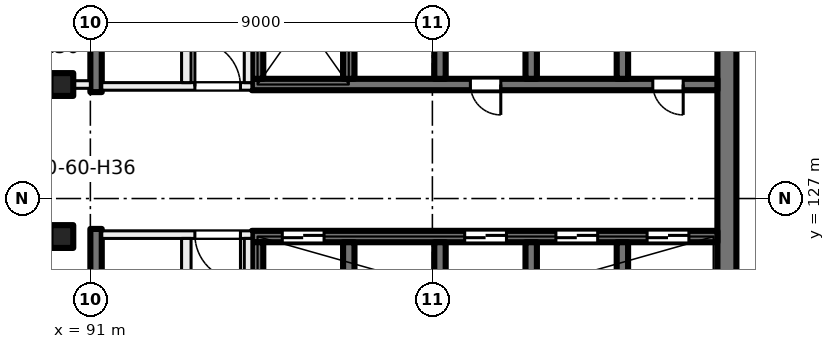
"""IFC4 building model, lengths in metres.
Left out: names, types, materials, properties, quantities, classifications, styles, units other than length and angle.
Written with IfcOpenShell. Run it as: python <this file> out.ifc"""

import sys

from ifc_helpers import new_model, si_unit, direction, frame, frame_2d, origin, origin_2d, place, context, subcontext, project, spatial, rectangle, extrude, element, fill, save


model = new_model("IFC4")
c1 = context("Model", 3, precision=1e-05, world=origin(), true_north=direction((0.0, 1.0)))
c2 = subcontext(c1, "Body", "Model", "MODEL_VIEW")
j1 = project(units=[si_unit("LENGTHUNIT", "METRE"), si_unit("PLANEANGLEUNIT", "RADIAN")], contexts=[c1])
p1 = place(None, origin())
s1 = spatial("IfcSite", under=j1, at=p1, CompositionType="ELEMENT")
p2 = place(p1, origin())
s2 = spatial("IfcBuilding", under=s1, at=p2, CompositionType="ELEMENT")
p3 = place(p2, frame((0.0, 0.0, 216.0)))
s3 = spatial("IfcBuildingStorey", under=s2, at=p3, CompositionType="ELEMENT", Elevation=216.0)
for number, where, z_axis, x_axis in (
    (1, (90.25, 130.0, 0.0), (0.0, 0.0, 1.0), (1.0, 0.0, 0.0)),
    (2, (90.25, 126.0, 0.0), (0.0, 0.0, 1.0), (1.0, 0.0, 0.0)),
):
    element("IfcColumn", number, at=place(p3, frame(where, z_axis=z_axis, x_axis=x_axis)), inside=s3, PredefinedType="COLUMN", context=c2, shape_type="SweptSolid", body=[
        extrude(rectangle(XDim=0.6, YDim=0.6, at=origin_2d()), origin(), (0.0, 0.0, 1.0), 4.0),
    ])
p4 = place(p3, frame((107.75, 135.2, 0.0), z_axis=(0.0, 0.0, 1.0), x_axis=(0.0, -1.0, 0.0)))
e3 = element("IfcWall", 3, at=p4, inside=s3, PredefinedType="SHEAR", context=c2, shape_type="SweptSolid", body=[
    extrude(rectangle(XDim=14.4, YDim=0.5, at=frame_2d((7.2, 0.0))), origin(), (0.0, 0.0, 1.0), 4.0),
])
p5 = place(p3, frame((107.5, 130.0, 0.0), z_axis=(0.0, 0.0, 1.0), x_axis=(-1.0, 0.0, 0.0)))
e4 = element("IfcWall", 4, at=p5, inside=s3, PredefinedType="SHEAR", context=c2, shape_type="SweptSolid", body=[
    extrude(rectangle(XDim=12.25, YDim=0.3, at=frame_2d((6.125, 0.0))), origin(), (0.0, 0.0, 1.0), 4.0),
])
p6 = place(p5, frame((0.9, 0.0, 0.0)))
e5 = element("IfcOpeningElement", 5, at=p6, cuts=e4, PredefinedType="OPENING", context=c2, shape_type="SweptSolid", body=[
    extrude(rectangle(XDim=0.8, YDim=2.1, at=frame_2d((0.4, 1.05))), frame((0.0, 0.16, 0.0), z_axis=(0.0, -1.0, 0.0), x_axis=(1.0, 0.0, 0.0)), (0.0, 0.0, 1.0), 0.32),
])
p7 = place(p5, frame((5.7, 0.0, 0.0)))
e6 = element("IfcOpeningElement", 6, at=p7, cuts=e4, PredefinedType="OPENING", context=c2, shape_type="SweptSolid", body=[
    extrude(rectangle(XDim=0.8, YDim=2.1, at=frame_2d((0.4, 1.05))), frame((0.0, 0.16, 0.0), z_axis=(0.0, -1.0, 0.0), x_axis=(1.0, 0.0, 0.0)), (0.0, 0.0, 1.0), 0.32),
])
for number, where, z_axis, x_axis in (
    (7, (105.0, 133.25, 0.0), (0.0, 0.0, 1.0), (0.0, -1.0, 0.0)),
    (8, (102.6, 133.25, 0.0), (0.0, 0.0, 1.0), (0.0, -1.0, 0.0)),
    (9, (100.2, 133.25, 0.0), (0.0, 0.0, 1.0), (0.0, -1.0, 0.0)),
    (10, (97.8, 133.25, 0.0), (0.0, 0.0, 1.0), (0.0, -1.0, 0.0)),
    (11, (95.4, 133.25, 0.0), (0.0, 0.0, 1.0), (0.0, -1.0, 0.0)),
):
    element("IfcWall", number, at=place(p3, frame(where, z_axis=z_axis, x_axis=x_axis)), inside=s3, PredefinedType="SHEAR", context=c2, shape_type="SweptSolid", body=[
        extrude(rectangle(XDim=3.1, YDim=0.3, at=frame_2d((1.55, 0.0))), origin(), (0.0, 0.0, 1.0), 4.0),
    ])
p8 = place(p3, frame((107.5, 126.0, 0.0), z_axis=(0.0, 0.0, 1.0), x_axis=(-1.0, 0.0, 0.0)))
e12 = element("IfcWall", 12, at=p8, inside=s3, PredefinedType="SHEAR", context=c2, shape_type="SweptSolid", body=[
    extrude(rectangle(XDim=12.25, YDim=0.3, at=frame_2d((6.125, 0.0))), origin(), (0.0, 0.0, 1.0), 4.0),
])
p9 = place(p8, frame((0.75, 0.0, 0.0)))
e13 = element("IfcOpeningElement", 13, at=p9, cuts=e12, PredefinedType="OPENING", context=c2, shape_type="SweptSolid", body=[
    extrude(rectangle(XDim=1.1, YDim=2.1, at=frame_2d((0.55, 1.05))), frame((0.0, 0.16, 0.0), z_axis=(0.0, -1.0, 0.0), x_axis=(1.0, 0.0, 0.0)), (0.0, 0.0, 1.0), 0.32),
])
p10 = place(p8, frame((3.15, 0.0, 0.0)))
e14 = element("IfcOpeningElement", 14, at=p10, cuts=e12, PredefinedType="OPENING", context=c2, shape_type="SweptSolid", body=[
    extrude(rectangle(XDim=1.1, YDim=2.1, at=frame_2d((0.55, 1.05))), frame((0.0, 0.16, 0.0), z_axis=(0.0, -1.0, 0.0), x_axis=(1.0, 0.0, 0.0)), (0.0, 0.0, 1.0), 0.32),
])
p11 = place(p8, frame((5.55, 0.0, 0.0)))
e15 = element("IfcOpeningElement", 15, at=p11, cuts=e12, PredefinedType="OPENING", context=c2, shape_type="SweptSolid", body=[
    extrude(rectangle(XDim=1.1, YDim=2.1, at=frame_2d((0.55, 1.05))), frame((0.0, 0.16, 0.0), z_axis=(0.0, -1.0, 0.0), x_axis=(1.0, 0.0, 0.0)), (0.0, 0.0, 1.0), 0.32),
])
p12 = place(p8, frame((10.35, 0.0, 0.0)))
e16 = element("IfcOpeningElement", 16, at=p12, cuts=e12, PredefinedType="OPENING", context=c2, shape_type="SweptSolid", body=[
    extrude(rectangle(XDim=1.1, YDim=2.1, at=frame_2d((0.55, 1.05))), frame((0.0, 0.16, 0.0), z_axis=(0.0, -1.0, 0.0), x_axis=(1.0, 0.0, 0.0)), (0.0, 0.0, 1.0), 0.32),
])
for number, where, z_axis, x_axis in (
    (17, (105.0, 125.85, 0.0), (0.0, 0.0, 1.0), (0.0, -1.0, 0.0)),
    (18, (102.6, 125.85, 0.0), (0.0, 0.0, 1.0), (0.0, -1.0, 0.0)),
    (19, (100.2, 125.85, 0.0), (0.0, 0.0, 1.0), (0.0, -1.0, 0.0)),
    (20, (97.8, 125.85, 0.0), (0.0, 0.0, 1.0), (0.0, -1.0, 0.0)),
    (21, (95.4, 125.85, 0.0), (0.0, 0.0, 1.0), (0.0, -1.0, 0.0)),
):
    element("IfcWall", number, at=place(p3, frame(where, z_axis=z_axis, x_axis=x_axis)), inside=s3, PredefinedType="SHEAR", context=c2, shape_type="SweptSolid", body=[
        extrude(rectangle(XDim=3.1, YDim=0.3, at=frame_2d((1.55, 0.0))), origin(), (0.0, 0.0, 1.0), 4.0),
    ])
for number, where, z_axis, x_axis in (
    (22, (91.15, 138.5, 0.0), (0.0, 0.0, 1.0), (0.0, -1.0, 0.0)),
    (23, (91.15, 126.2, 0.0), (0.0, 0.0, 1.0), (0.0, -1.0, 0.0)),
):
    element("IfcWall", number, at=place(p3, frame(where, z_axis=z_axis, x_axis=x_axis)), inside=s3, PredefinedType="SHEAR", context=c2, shape_type="SweptSolid", body=[
        extrude(rectangle(XDim=8.7, YDim=0.3, at=frame_2d((4.35, 0.0))), origin(), (0.0, 0.0, 1.0), 4.0),
    ])
p13 = place(p3, frame((95.25, 126.05, 0.0), z_axis=(0.0, 0.0, 1.0), x_axis=(-1.0, 0.0, 0.0)))
e24 = element("IfcWall", 24, at=p13, inside=s3, PredefinedType="PARTITIONING", context=c2, shape_type="SweptSolid", body=[
    extrude(rectangle(XDim=3.95, YDim=0.2, at=frame_2d((1.975, 0.0))), origin(), (0.0, 0.0, 1.0), 3.625),
])
p14 = place(p13, frame((0.3, 0.0, 0.0)))
e25 = element("IfcOpeningElement", 25, at=p14, cuts=e24, PredefinedType="OPENING", context=c2, shape_type="SweptSolid", body=[
    extrude(rectangle(XDim=1.2, YDim=2.1, at=frame_2d((0.6, 1.05))), frame((0.0, 0.11, 0.0), z_axis=(0.0, -1.0, 0.0), x_axis=(1.0, 0.0, 0.0)), (0.0, 0.0, 1.0), 0.22),
])
p15 = place(p3, frame((95.15, 117.5, 0.0), z_axis=(0.0, 0.0, 1.0), x_axis=(0.0, 1.0, 0.0)))
e26 = element("IfcWall", 26, at=p15, inside=s3, PredefinedType="PARTITIONING", context=c2, shape_type="SweptSolid", body=[
    extrude(rectangle(XDim=8.45, YDim=0.2, at=frame_2d((4.225, 0.0))), origin(), (0.0, 0.0, 1.0), 3.625),
])
p16 = place(p15, frame((1.725, 0.0, 0.0)))
e27 = element("IfcOpeningElement", 27, at=p16, cuts=e26, PredefinedType="OPENING", context=c2, shape_type="SweptSolid", body=[
    extrude(rectangle(XDim=1.5, YDim=2.1, at=frame_2d((0.75, 1.05))), frame((0.0, 0.11, 0.0), z_axis=(0.0, -1.0, 0.0), x_axis=(1.0, 0.0, 0.0)), (0.0, 0.0, 1.0), 0.22),
])
p17 = place(p3, frame((93.525, 117.5, 0.0), z_axis=(0.0, 0.0, 1.0), x_axis=(0.0, 1.0, 0.0)))
e28 = element("IfcWall", 28, at=p17, inside=s3, PredefinedType="PARTITIONING", context=c2, shape_type="SweptSolid", body=[
    extrude(rectangle(XDim=8.45, YDim=0.25, at=frame_2d((4.225, 0.0))), origin(), (0.0, 0.0, 1.0), 3.625),
])
p18 = place(p17, frame((5.96, 0.0, 0.0)))
e29 = element("IfcOpeningElement", 29, at=p18, cuts=e28, PredefinedType="OPENING", context=c2, shape_type="SweptSolid", body=[
    extrude(rectangle(XDim=0.8, YDim=2.1, at=frame_2d((0.4, 1.05))), frame((0.0, 0.135, 0.0), z_axis=(0.0, -1.0, 0.0), x_axis=(1.0, 0.0, 0.0)), (0.0, 0.0, 1.0), 0.27),
])
p19 = place(p17, frame((1.585, 0.0, 0.0)))
e30 = element("IfcOpeningElement", 30, at=p19, cuts=e28, PredefinedType="OPENING", context=c2, shape_type="SweptSolid", body=[
    extrude(rectangle(XDim=1.0, YDim=2.1, at=frame_2d((0.5, 1.05))), frame((0.0, 0.135, 0.0), z_axis=(0.0, -1.0, 0.0), x_axis=(1.0, 0.0, 0.0)), (0.0, 0.0, 1.0), 0.27),
])
p20 = place(p3, frame((91.3, 129.95, 0.0), z_axis=(0.0, 0.0, 1.0), x_axis=(1.0, 0.0, 0.0)))
e31 = element("IfcWall", 31, at=p20, inside=s3, PredefinedType="PARTITIONING", context=c2, shape_type="SweptSolid", body=[
    extrude(rectangle(XDim=3.95, YDim=0.2, at=frame_2d((1.975, 0.0))), origin(), (0.0, 0.0, 1.0), 3.625),
])
p21 = place(p20, frame((2.45, 0.0, 0.0)))
e32 = element("IfcOpeningElement", 32, at=p21, cuts=e31, PredefinedType="OPENING", context=c2, shape_type="SweptSolid", body=[
    extrude(rectangle(XDim=1.2, YDim=2.1, at=frame_2d((0.6, 1.05))), frame((0.0, 0.11, 0.0), z_axis=(0.0, -1.0, 0.0), x_axis=(1.0, 0.0, 0.0)), (0.0, 0.0, 1.0), 0.22),
])
p22 = place(p3, frame((95.15, 130.05, 0.0), z_axis=(0.0, 0.0, 1.0), x_axis=(0.0, 1.0, 0.0)))
e33 = element("IfcWall", 33, at=p22, inside=s3, PredefinedType="PARTITIONING", context=c2, shape_type="SweptSolid", body=[
    extrude(rectangle(XDim=8.45, YDim=0.2, at=frame_2d((4.225, 0.0))), origin(), (0.0, 0.0, 1.0), 3.625),
])
p23 = place(p22, frame((5.225, 0.0, 0.0)))
e34 = element("IfcOpeningElement", 34, at=p23, cuts=e33, PredefinedType="OPENING", context=c2, shape_type="SweptSolid", body=[
    extrude(rectangle(XDim=1.5, YDim=2.1, at=frame_2d((0.75, 1.05))), frame((0.0, 0.11, 0.0), z_axis=(0.0, -1.0, 0.0), x_axis=(1.0, 0.0, 0.0)), (0.0, 0.0, 1.0), 0.22),
])
p24 = place(p3, frame((93.525, 130.05, 0.0), z_axis=(0.0, 0.0, 1.0), x_axis=(0.0, 1.0, 0.0)))
e35 = element("IfcWall", 35, at=p24, inside=s3, PredefinedType="PARTITIONING", context=c2, shape_type="SweptSolid", body=[
    extrude(rectangle(XDim=8.45, YDim=0.25, at=frame_2d((4.225, 0.0))), origin(), (0.0, 0.0, 1.0), 3.625),
])
p25 = place(p24, frame((2.39, 0.0, 0.0)))
e36 = element("IfcOpeningElement", 36, at=p25, cuts=e35, PredefinedType="OPENING", context=c2, shape_type="SweptSolid", body=[
    extrude(rectangle(XDim=0.8, YDim=2.1, at=frame_2d((0.4, 1.05))), frame((0.0, 0.135, 0.0), z_axis=(0.0, -1.0, 0.0), x_axis=(1.0, 0.0, 0.0)), (0.0, 0.0, 1.0), 0.27),
])
p26 = place(p24, frame((6.665, 0.0, 0.0)))
e37 = element("IfcOpeningElement", 37, at=p26, cuts=e35, PredefinedType="OPENING", context=c2, shape_type="SweptSolid", body=[
    extrude(rectangle(XDim=0.8, YDim=2.1, at=frame_2d((0.4, 1.05))), frame((0.0, 0.135, 0.0), z_axis=(0.0, -1.0, 0.0), x_axis=(1.0, 0.0, 0.0)), (0.0, 0.0, 1.0), 0.27),
])
p27 = place(p3, frame((87.7, 130.0, 0.0), z_axis=(0.0, 0.0, 1.0), x_axis=(1.0, 0.0, 0.0)))
e38 = element("IfcWall", 38, at=p27, inside=s3, PredefinedType="PARTITIONING", context=c2, shape_type="SweptSolid", body=[
    extrude(rectangle(XDim=3.3, YDim=0.2, at=frame_2d((1.65, 0.0))), origin(), (0.0, 0.0, 1.0), 3.625),
])
p28 = place(p9, origin())
e39 = element("IfcDoor", 39, at=p28, inside=s3, OperationType="DOUBLE_DOOR_SLIDING", PredefinedType="DOOR", context=c2, shape_type="SweptSolid", body=[
    extrude(rectangle(XDim=1.1, YDim=2.1, at=frame_2d((0.55, 1.05))), frame((0.0, 0.025, 0.0), z_axis=(0.0, -1.0, 0.0), x_axis=(1.0, 0.0, 0.0)), (0.0, 0.0, 1.0), 0.05),
])
fill(e13, e39)
p29 = place(p10, origin())
e40 = element("IfcDoor", 40, at=p29, inside=s3, OperationType="DOUBLE_DOOR_SLIDING", PredefinedType="DOOR", context=c2, shape_type="SweptSolid", body=[
    extrude(rectangle(XDim=1.1, YDim=2.1, at=frame_2d((0.55, 1.05))), frame((0.0, 0.025, 0.0), z_axis=(0.0, -1.0, 0.0), x_axis=(1.0, 0.0, 0.0)), (0.0, 0.0, 1.0), 0.05),
])
fill(e14, e40)
p30 = place(p11, origin())
e41 = element("IfcDoor", 41, at=p30, inside=s3, OperationType="DOUBLE_DOOR_SLIDING", PredefinedType="DOOR", context=c2, shape_type="SweptSolid", body=[
    extrude(rectangle(XDim=1.1, YDim=2.1, at=frame_2d((0.55, 1.05))), frame((0.0, 0.025, 0.0), z_axis=(0.0, -1.0, 0.0), x_axis=(1.0, 0.0, 0.0)), (0.0, 0.0, 1.0), 0.05),
])
fill(e15, e41)
p31 = place(p12, origin())
e42 = element("IfcDoor", 42, at=p31, inside=s3, OperationType="DOUBLE_DOOR_SLIDING", PredefinedType="DOOR", context=c2, shape_type="SweptSolid", body=[
    extrude(rectangle(XDim=1.1, YDim=2.1, at=frame_2d((0.55, 1.05))), frame((0.0, 0.025, 0.0), z_axis=(0.0, -1.0, 0.0), x_axis=(1.0, 0.0, 0.0)), (0.0, 0.0, 1.0), 0.05),
])
fill(e16, e42)
p32 = place(p6, origin())
e43 = element("IfcDoor", 43, at=p32, inside=s3, OperationType="SINGLE_SWING_LEFT", PredefinedType="DOOR", context=c2, shape_type="SweptSolid", body=[
    extrude(rectangle(XDim=0.8, YDim=2.1, at=frame_2d((0.4, 1.05))), frame((0.0, 0.025, 0.0), z_axis=(0.0, -1.0, 0.0), x_axis=(1.0, 0.0, 0.0)), (0.0, 0.0, 1.0), 0.05),
])
fill(e5, e43)
p33 = place(p7, origin())
e44 = element("IfcDoor", 44, at=p33, inside=s3, OperationType="SINGLE_SWING_RIGHT", PredefinedType="DOOR", context=c2, shape_type="SweptSolid", body=[
    extrude(rectangle(XDim=0.8, YDim=2.1, at=frame_2d((0.4, 1.05))), frame((0.0, 0.025, 0.0), z_axis=(0.0, -1.0, 0.0), x_axis=(1.0, 0.0, 0.0)), (0.0, 0.0, 1.0), 0.05),
])
fill(e6, e44)
p34 = place(p14, origin())
e45 = element("IfcDoor", 45, at=p34, inside=s3, OperationType="DOUBLE_DOOR_SINGLE_SWING", PredefinedType="DOOR", context=c2, shape_type="SweptSolid", body=[
    extrude(rectangle(XDim=1.2, YDim=2.1, at=frame_2d((0.6, 1.05))), frame((0.0, 0.025, 0.0), z_axis=(0.0, -1.0, 0.0), x_axis=(1.0, 0.0, 0.0)), (0.0, 0.0, 1.0), 0.05),
])
fill(e25, e45)
p35 = place(p21, origin())
e46 = element("IfcDoor", 46, at=p35, inside=s3, OperationType="DOUBLE_DOOR_SINGLE_SWING", PredefinedType="DOOR", context=c2, shape_type="SweptSolid", body=[
    extrude(rectangle(XDim=1.2, YDim=2.1, at=frame_2d((0.6, 1.05))), frame((0.0, 0.025, 0.0), z_axis=(0.0, -1.0, 0.0), x_axis=(1.0, 0.0, 0.0)), (0.0, 0.0, 1.0), 0.05),
])
fill(e32, e46)
save(model, sys.argv[1])
